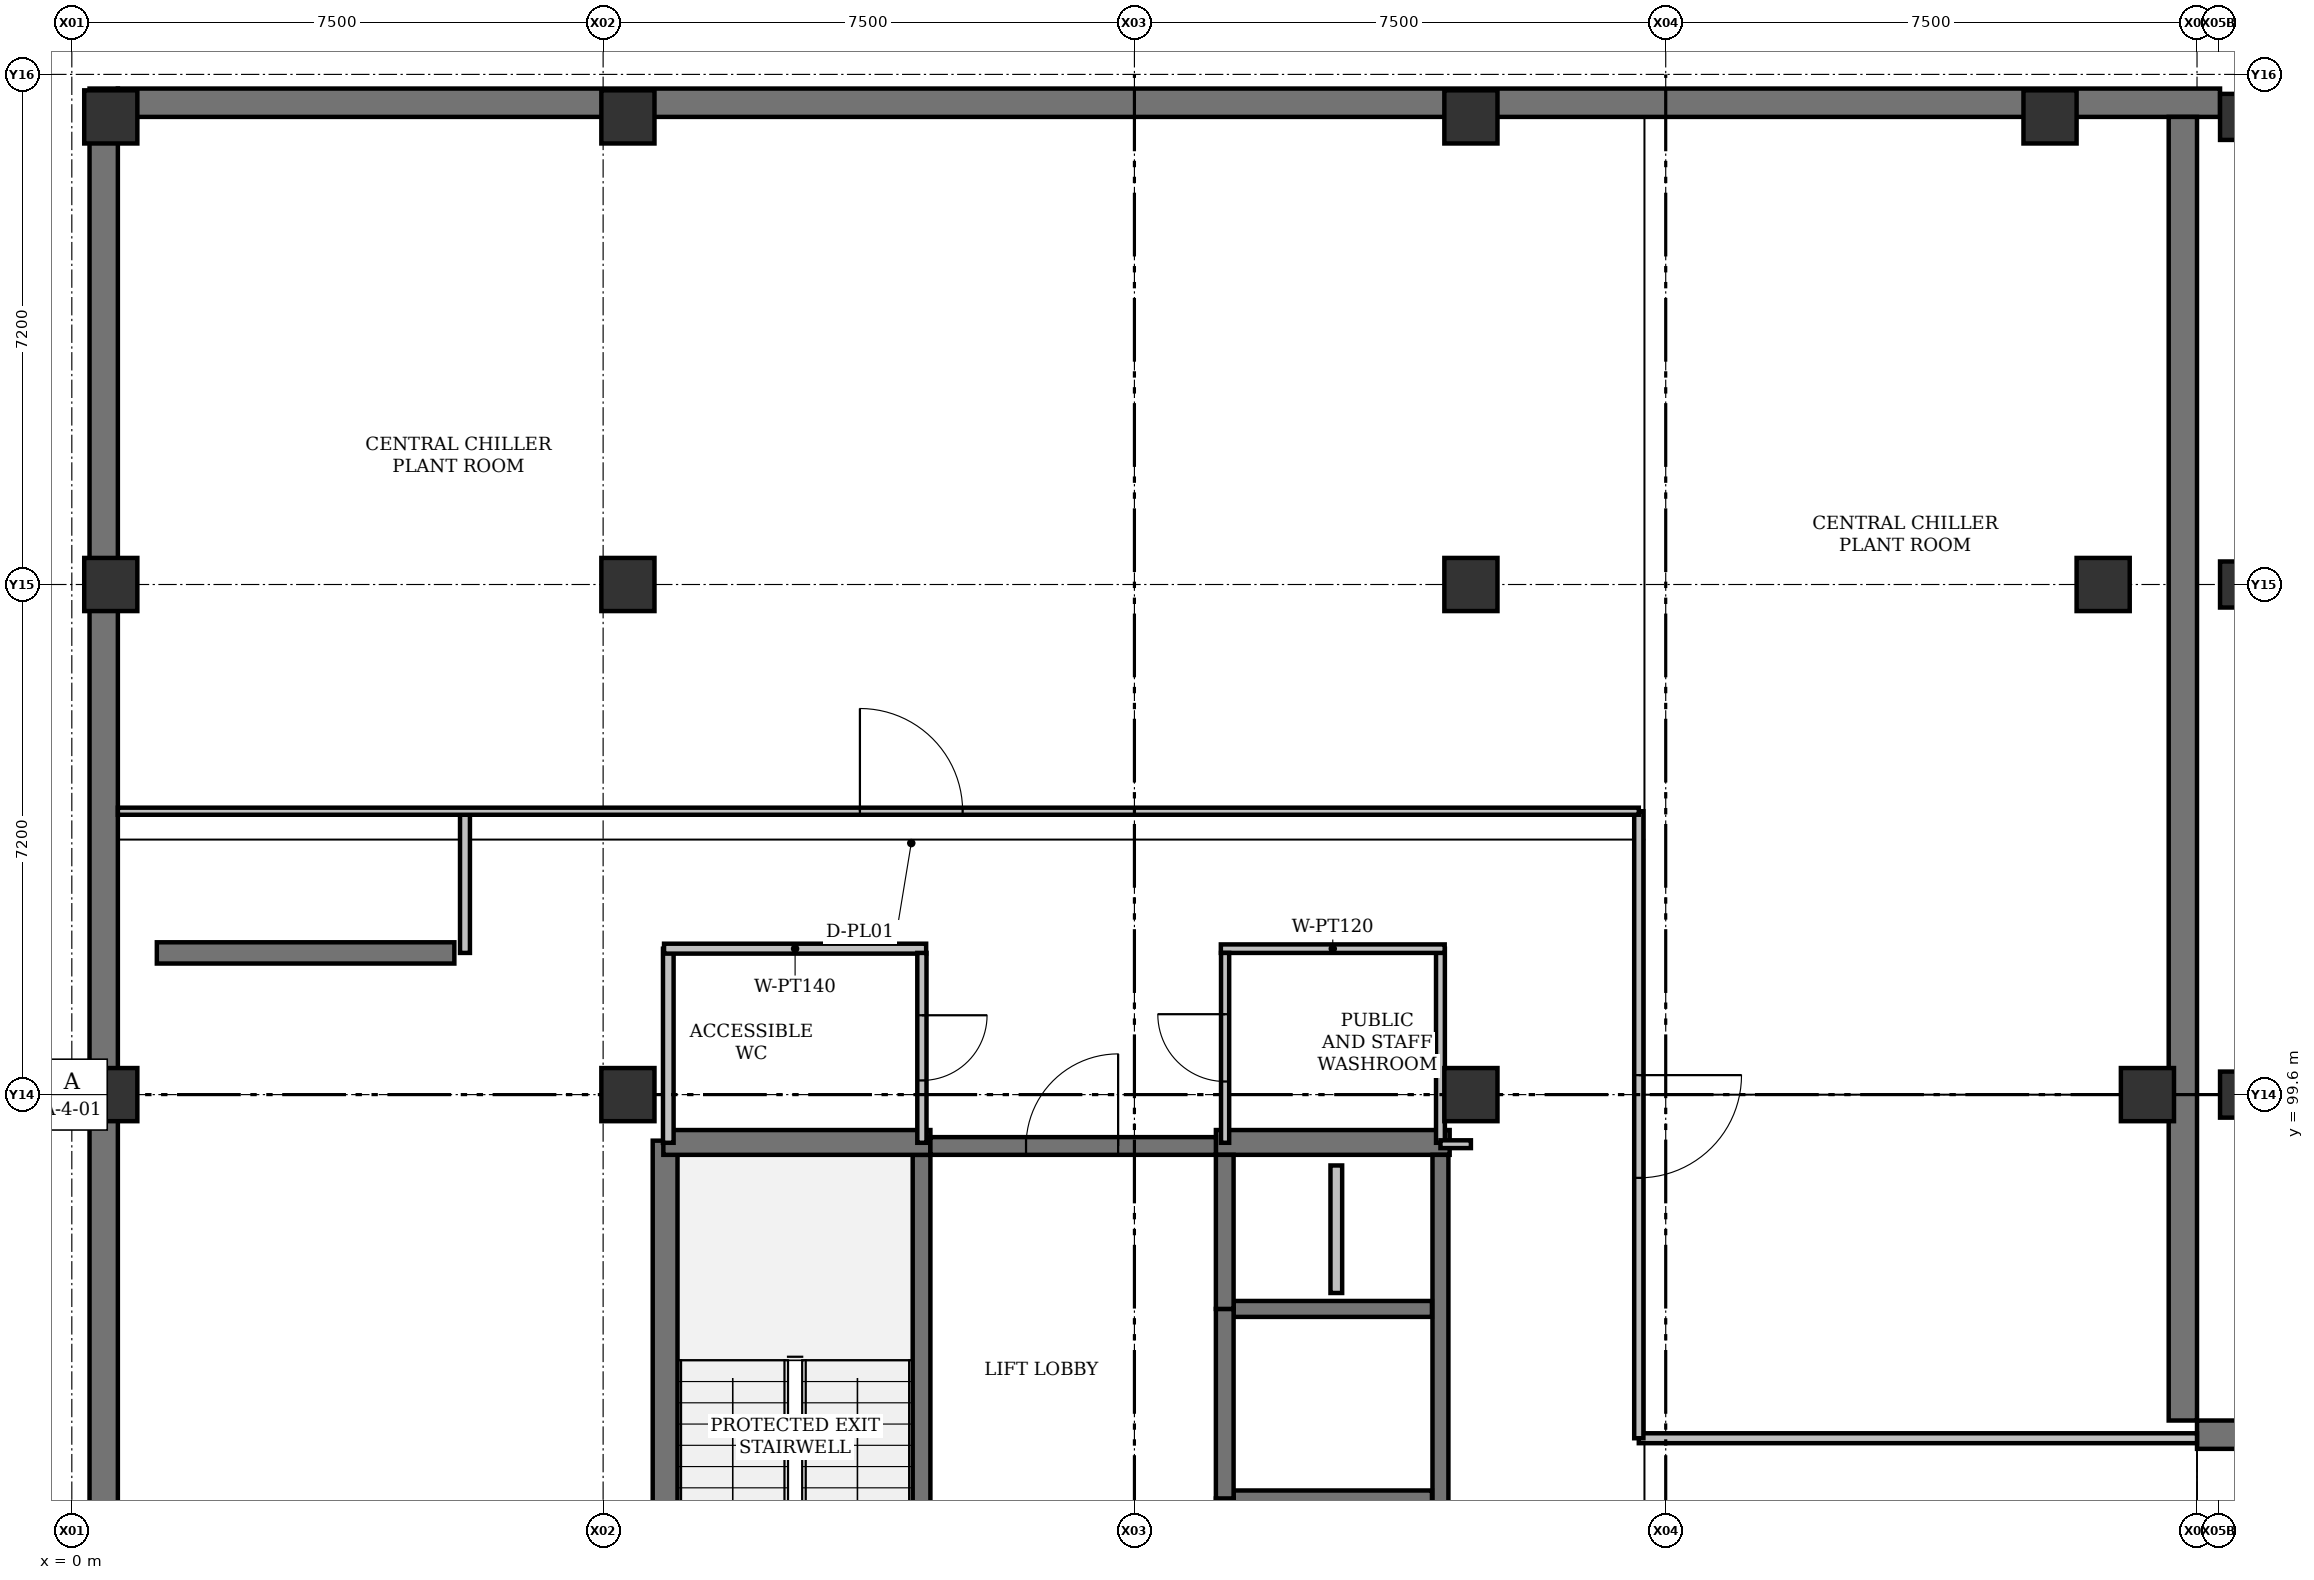
"""IFC4 building model, lengths in metres.
Left out: names, types, materials, properties, quantities, classifications, styles, units other than length and angle.
Written with IfcOpenShell. Run it as: python <this file> out.ifc"""

import sys

from ifc_helpers import new_model, si_unit, direction, frame, frame_2d, origin, origin_2d, place, context, subcontext, project, spatial, rectangle, extrude, element, fill, save


model = new_model("IFC4")
c1 = context("Model", 3, precision=1e-05, world=origin(), true_north=direction((0.0, 1.0)))
c2 = subcontext(c1, "Body", "Model", "MODEL_VIEW")
j1 = project(units=[si_unit("LENGTHUNIT", "METRE"), si_unit("PLANEANGLEUNIT", "RADIAN")], contexts=[c1])
p1 = place(None, origin())
s1 = spatial("IfcSite", under=j1, at=p1, CompositionType="ELEMENT")
p2 = place(p1, origin())
s2 = spatial("IfcBuilding", under=s1, at=p2, CompositionType="ELEMENT")
p3 = place(p2, frame((0.0, 0.0, -8.4)))
s3 = spatial("IfcBuildingStorey", under=s2, at=p3, CompositionType="ELEMENT", Elevation=-8.4)
for number, where, z_axis, x_axis in (
    (1, (0.55, 99.6, -0.3), (0.0, 0.0, 1.0), (1.0, 0.0, 0.0)),
    (2, (7.85, 99.6, -0.3), (0.0, 0.0, 1.0), (1.0, 0.0, 0.0)),
    (3, (19.75, 99.6, -0.3), (0.0, 0.0, 1.0), (1.0, 0.0, 0.0)),
    (4, (29.3, 99.6, -0.3), (0.0, 0.0, 1.0), (1.0, 0.0, 0.0)),
    (5, (0.55, 106.8, -0.3), (0.0, 0.0, 1.0), (1.0, 0.0, 0.0)),
    (6, (7.85, 106.8, -0.3), (0.0, 0.0, 1.0), (1.0, 0.0, 0.0)),
    (7, (19.75, 106.8, -0.3), (0.0, 0.0, 1.0), (1.0, 0.0, 0.0)),
    (8, (28.675, 106.8, -0.3), (0.0, 0.0, 1.0), (1.0, 0.0, 0.0)),
    (9, (0.55, 113.4, -0.3), (0.0, 0.0, 1.0), (1.0, 0.0, 0.0)),
    (10, (7.85, 113.4, -0.3), (0.0, 0.0, 1.0), (1.0, 0.0, 0.0)),
    (11, (19.75, 113.4, -0.3), (0.0, 0.0, 1.0), (1.0, 0.0, 0.0)),
    (12, (27.925, 113.4, -0.3), (0.0, 0.0, 1.0), (1.0, 0.0, 0.0)),
):
    element("IfcColumn", number, at=place(p3, frame(where, z_axis=z_axis, x_axis=x_axis)), inside=s3, PredefinedType="COLUMN", context=c2, shape_type="SweptSolid", body=[
        extrude(rectangle(XDim=0.75, YDim=0.75, at=origin_2d()), origin(), (0.0, 0.0, 1.0), 4.5),
    ])
for number, where, z_axis, x_axis in (
    (13, (30.65, 113.4, -0.3), (0.0, 0.0, 1.0), (1.0, 0.0, 0.0)),
    (14, (30.65, 99.6, -0.3), (0.0, 0.0, 1.0), (1.0, 0.0, 0.0)),
    (15, (30.65, 106.8, -0.3), (0.0, 0.0, 1.0), (1.0, 0.0, 0.0)),
):
    element("IfcColumn", number, at=place(p3, frame(where, z_axis=z_axis, x_axis=x_axis)), inside=s3, PredefinedType="COLUMN", context=c2, shape_type="SweptSolid", body=[
        extrude(rectangle(XDim=0.65, YDim=0.65, at=origin_2d()), origin(), (0.0, 0.0, 1.0), 4.5),
    ])
p4 = place(p3, frame((0.45, 0.2, -0.3), z_axis=(0.0, 0.0, 1.0), x_axis=(0.0, 1.0, 0.0)))
e16 = element("IfcWall", 16, at=p4, inside=s3, PredefinedType="USERDEFINED", context=c2, shape_type="SweptSolid", body=[
    extrude(rectangle(XDim=113.6, YDim=0.4, at=frame_2d((56.8, 0.0))), origin(), (0.0, 0.0, 1.0), 4.26),
])
p5 = place(p3, frame((0.65, 113.6, -0.3), z_axis=(0.0, 0.0, 1.0), x_axis=(1.0, 0.0, 0.0)))
e17 = element("IfcWall", 17, at=p5, inside=s3, PredefinedType="USERDEFINED", context=c2, shape_type="SweptSolid", body=[
    extrude(rectangle(XDim=29.675, YDim=0.4, at=frame_2d((14.837, 0.0))), origin(), (0.0, 0.0, 1.0), 4.26),
])
p6 = place(p3, frame((29.8, 113.4, -0.3), z_axis=(0.0, 0.0, 1.0), x_axis=(0.0, -1.0, 0.0)))
e18 = element("IfcWall", 18, at=p6, inside=s3, PredefinedType="USERDEFINED", context=c2, shape_type="SweptSolid", body=[
    extrude(rectangle(XDim=18.4, YDim=0.4, at=frame_2d((9.2, 0.0))), origin(), (0.0, 0.0, 1.0), 4.26),
])
p7 = place(p3, frame((30.0, 94.8, -0.3), z_axis=(0.0, 0.0, 1.0), x_axis=(1.0, 0.0, 0.0)))
e19 = element("IfcWall", 19, at=p7, inside=s3, PredefinedType="USERDEFINED", context=c2, shape_type="SweptSolid", body=[
    extrude(rectangle(XDim=37.0, YDim=0.4, at=frame_2d((18.5, 0.0))), origin(), (0.0, 0.0, 1.0), 4.26),
])
p8 = place(p3, frame((8.375, 90.775, -0.3), z_axis=(0.0, 0.0, 1.0), x_axis=(0.0, 1.0, 0.0)))
e20 = element("IfcWall", 20, at=p8, inside=s3, PredefinedType="SHEAR", context=c2, shape_type="SweptSolid", body=[
    extrude(rectangle(XDim=8.175, YDim=0.35, at=frame_2d((4.087, 0.0))), origin(), (0.0, 0.0, 1.0), 4.5),
])
p9 = place(p3, frame((11.995, 90.9, -0.3), z_axis=(0.0, 0.0, 1.0), x_axis=(0.0, 1.0, 0.0)))
e21 = element("IfcWall", 21, at=p9, inside=s3, PredefinedType="SHEAR", context=c2, shape_type="SweptSolid", body=[
    extrude(rectangle(XDim=7.85, YDim=0.25, at=frame_2d((3.925, 0.0))), origin(), (0.0, 0.0, 1.0), 4.5),
])
p10 = place(p3, frame((8.35, 98.925, -0.3), z_axis=(0.0, 0.0, 1.0), x_axis=(1.0, 0.0, 0.0)))
e22 = element("IfcWall", 22, at=p10, inside=s3, PredefinedType="SHEAR", context=c2, shape_type="SweptSolid", body=[
    extrude(rectangle(XDim=3.77, YDim=0.35, at=frame_2d((1.885, 0.0))), origin(), (0.0, 0.0, 1.0), 4.5),
])
p11 = place(p3, frame((16.15, 98.925, -0.3), z_axis=(0.0, 0.0, 1.0), x_axis=(1.0, 0.0, 0.0)))
e23 = element("IfcWall", 23, at=p11, inside=s3, PredefinedType="SHEAR", context=c2, shape_type="SweptSolid", body=[
    extrude(rectangle(XDim=3.3, YDim=0.35, at=frame_2d((1.65, 0.0))), origin(), (0.0, 0.0, 1.0), 4.5),
])
p12 = place(p3, frame((12.12, 98.875, -0.3), z_axis=(0.0, 0.0, 1.0), x_axis=(1.0, 0.0, 0.0)))
e24 = element("IfcWall", 24, at=p12, inside=s3, PredefinedType="SHEAR", context=c2, shape_type="SweptSolid", body=[
    extrude(rectangle(XDim=4.03, YDim=0.25, at=frame_2d((2.015, 0.0))), origin(), (0.0, 0.0, 1.0), 4.5),
])
p13 = place(p12, frame((1.35, 0.0, 0.3)))
e25 = element("IfcOpeningElement", 25, at=p13, cuts=e24, PredefinedType="OPENING", context=c2, shape_type="SweptSolid", body=[
    extrude(rectangle(XDim=1.3, YDim=2.2, at=frame_2d((0.65, 1.1))), frame((0.0, 0.125, 0.0), z_axis=(0.0, -1.0, 0.0), x_axis=(1.0, 0.0, 0.0)), (0.0, 0.0, 1.0), 0.25),
])
p14 = place(p3, frame((19.32, 84.8, -0.3), z_axis=(0.0, 0.0, 1.0), x_axis=(0.0, 1.0, 0.0)))
e26 = element("IfcWall", 26, at=p14, inside=s3, PredefinedType="SHEAR", context=c2, shape_type="SweptSolid", body=[
    extrude(rectangle(XDim=13.95, YDim=0.225, at=frame_2d((6.975, 0.0))), origin(), (0.0, 0.0, 1.0), 4.5),
])
for number, where, z_axis, x_axis in (
    (27, (16.4, 93.9, -0.3), (0.0, 0.0, 1.0), (1.0, 0.0, 0.0)),
    (28, (16.4, 96.575, -0.3), (0.0, 0.0, 1.0), (1.0, 0.0, 0.0)),
):
    element("IfcWall", number, at=place(p3, frame(where, z_axis=z_axis, x_axis=x_axis)), inside=s3, PredefinedType="SHEAR", context=c2, shape_type="SweptSolid", body=[
        extrude(rectangle(XDim=2.8, YDim=0.225, at=frame_2d((1.4, 0.0))), origin(), (0.0, 0.0, 1.0), 4.5),
    ])
p15 = place(p3, frame((16.275, 91.725, -0.3), z_axis=(0.0, 0.0, 1.0), x_axis=(0.0, 1.0, 0.0)))
e29 = element("IfcWall", 29, at=p15, inside=s3, PredefinedType="SHEAR", context=c2, shape_type="SweptSolid", body=[
    extrude(rectangle(XDim=2.175, YDim=0.25, at=frame_2d((1.087, 0.0))), origin(), (0.0, 0.0, 1.0), 4.5),
])
p16 = place(p15, frame((0.55, 0.0, 0.3)))
e30 = element("IfcOpeningElement", 30, at=p16, cuts=e29, PredefinedType="OPENING", context=c2, shape_type="SweptSolid", body=[
    extrude(rectangle(XDim=1.05, YDim=2.15, at=frame_2d((0.525, 1.075))), frame((0.0, 0.125, 0.0), z_axis=(0.0, -1.0, 0.0), x_axis=(1.0, 0.0, 0.0)), (0.0, 0.0, 1.0), 0.25),
])
p17 = place(p3, frame((16.275, 93.9, -0.3), z_axis=(0.0, 0.0, 1.0), x_axis=(0.0, 1.0, 0.0)))
e31 = element("IfcWall", 31, at=p17, inside=s3, PredefinedType="SHEAR", context=c2, shape_type="SweptSolid", body=[
    extrude(rectangle(XDim=2.675, YDim=0.25, at=frame_2d((1.337, 0.0))), origin(), (0.0, 0.0, 1.0), 4.5),
])
p18 = place(p3, frame((16.275, 96.575, -0.3), z_axis=(0.0, 0.0, 1.0), x_axis=(0.0, 1.0, 0.0)))
e32 = element("IfcWall", 32, at=p18, inside=s3, PredefinedType="SHEAR", context=c2, shape_type="SweptSolid", body=[
    extrude(rectangle(XDim=2.175, YDim=0.25, at=frame_2d((1.087, 0.0))), origin(), (0.0, 0.0, 1.0), 4.5),
])
p19 = place(p3, frame((17.85, 96.8, -0.3), z_axis=(0.0, 0.0, 1.0), x_axis=(0.0, 1.0, 0.0)))
e33 = element("IfcWall", 33, at=p19, inside=s3, PredefinedType="PLUMBINGWALL", context=c2, shape_type="SweptSolid", body=[
    extrude(rectangle(XDim=1.8, YDim=0.165, at=frame_2d((0.9, 0.0))), origin(), (0.0, 0.0, 1.0), 4.5),
])
p20 = place(p3, frame((1.2, 101.6, -0.3), z_axis=(0.0, 0.0, 1.0), x_axis=(1.0, 0.0, 0.0)))
e34 = element("IfcWall", 34, at=p20, inside=s3, PredefinedType="SHEAR", context=c2, shape_type="SweptSolid", body=[
    extrude(rectangle(XDim=4.2, YDim=0.3, at=frame_2d((2.1, 0.0))), origin(), (0.0, 0.0, 1.0), 4.5),
])
p21 = place(p3, frame((8.42, 98.92, 0.0), z_axis=(0.0, 0.0, 1.0), x_axis=(0.0, 1.0, 0.0)))
e35 = element("IfcWall", 35, at=p21, inside=s3, PredefinedType="PARTITIONING", context=c2, shape_type="SweptSolid", body=[
    extrude(rectangle(XDim=2.74, YDim=0.15, at=frame_2d((1.37, 0.0))), origin(), (0.0, 0.0, 1.0), 3.411),
])
p22 = place(p3, frame((8.36, 101.66, 0.0), z_axis=(0.0, 0.0, 1.0), x_axis=(1.0, 0.0, 0.0)))
e36 = element("IfcWall", 36, at=p22, inside=s3, PredefinedType="PARTITIONING", context=c2, shape_type="SweptSolid", body=[
    extrude(rectangle(XDim=3.7, YDim=0.14, at=frame_2d((1.85, 0.0))), origin(), (0.0, 0.0, 1.0), 3.95),
])
p23 = place(p3, frame((12.0, 101.6, 0.0), z_axis=(0.0, 0.0, 1.0), x_axis=(0.0, -1.0, 0.0)))
e37 = element("IfcWall", 37, at=p23, inside=s3, PredefinedType="PARTITIONING", context=c2, shape_type="SweptSolid", body=[
    extrude(rectangle(XDim=2.68, YDim=0.13, at=frame_2d((1.34, 0.0))), origin(), (0.0, 0.0, 1.0), 3.411),
])
p24 = place(p23, frame((0.88, 0.0, 0.0)))
e38 = element("IfcOpeningElement", 38, at=p24, cuts=e37, PredefinedType="OPENING", context=c2, shape_type="SweptSolid", body=[
    extrude(rectangle(XDim=0.92, YDim=2.1, at=frame_2d((0.46, 1.05))), frame((0.0, 0.065, 0.0), z_axis=(0.0, -1.0, 0.0), x_axis=(1.0, 0.0, 0.0)), (0.0, 0.0, 1.0), 0.13),
])
p25 = place(p3, frame((19.32, 98.92, 0.0), z_axis=(0.0, 0.0, 1.0), x_axis=(0.0, 1.0, 0.0)))
e39 = element("IfcWall", 39, at=p25, inside=s3, PredefinedType="PARTITIONING", context=c2, shape_type="SweptSolid", body=[
    extrude(rectangle(XDim=2.74, YDim=0.125, at=frame_2d((1.37, 0.0))), origin(), (0.0, 0.0, 1.0), 3.411),
])
p26 = place(p3, frame((19.38, 101.66, 0.0), z_axis=(0.0, 0.0, 1.0), x_axis=(-1.0, 0.0, 0.0)))
e40 = element("IfcWall", 40, at=p26, inside=s3, PredefinedType="PARTITIONING", context=c2, shape_type="SweptSolid", body=[
    extrude(rectangle(XDim=3.16, YDim=0.12, at=frame_2d((1.58, 0.0))), origin(), (0.0, 0.0, 1.0), 3.95),
])
p27 = place(p3, frame((16.28, 98.92, 0.0), z_axis=(0.0, 0.0, 1.0), x_axis=(0.0, 1.0, 0.0)))
e41 = element("IfcWall", 41, at=p27, inside=s3, PredefinedType="PARTITIONING", context=c2, shape_type="SweptSolid", body=[
    extrude(rectangle(XDim=2.68, YDim=0.115, at=frame_2d((1.34, 0.0))), origin(), (0.0, 0.0, 1.0), 3.411),
])
p28 = place(p27, frame((0.865, 0.0, 0.0)))
e42 = element("IfcOpeningElement", 42, at=p28, cuts=e41, PredefinedType="OPENING", context=c2, shape_type="SweptSolid", body=[
    extrude(rectangle(XDim=0.95, YDim=2.1, at=frame_2d((0.475, 1.05))), frame((0.0, 0.058, 0.0), z_axis=(0.0, -1.0, 0.0), x_axis=(1.0, 0.0, 0.0)), (0.0, 0.0, 1.0), 0.115),
])
p29 = place(p3, frame((19.75, 98.9, 0.0), z_axis=(0.0, 0.0, 1.0), x_axis=(-1.0, 0.0, 0.0)))
e43 = element("IfcWall", 43, at=p29, inside=s3, PredefinedType="PARTITIONING", context=c2, shape_type="SweptSolid", body=[
    extrude(rectangle(XDim=0.43, YDim=0.11, at=frame_2d((0.215, 0.0))), origin(), (0.0, 0.0, 1.0), 3.487),
])
p30 = place(p3, frame((5.55, 101.6, 0.0), z_axis=(0.0, 0.0, 1.0), x_axis=(0.0, 1.0, 0.0)))
e44 = element("IfcWall", 44, at=p30, inside=s3, PredefinedType="PARTITIONING", context=c2, shape_type="SweptSolid", body=[
    extrude(rectangle(XDim=2.0, YDim=0.14, at=frame_2d((1.0, 0.0))), origin(), (0.0, 0.0, 1.0), 3.637),
])
p31 = place(p3, frame((22.12, 94.75, 0.0), z_axis=(0.0, 0.0, 1.0), x_axis=(1.0, 0.0, 0.0)))
e45 = element("IfcWall", 45, at=p31, inside=s3, PredefinedType="PARTITIONING", context=c2, shape_type="SweptSolid", body=[
    extrude(rectangle(XDim=7.88, YDim=0.14, at=frame_2d((3.94, 0.0))), origin(), (0.0, 0.0, 1.0), 3.537),
])
p32 = place(p3, frame((22.12, 103.6, 0.0), z_axis=(0.0, 0.0, 1.0), x_axis=(0.0, -1.0, 0.0)))
e46 = element("IfcWall", 46, at=p32, inside=s3, PredefinedType="PARTITIONING", context=c2, shape_type="SweptSolid", body=[
    extrude(rectangle(XDim=8.85, YDim=0.13, at=frame_2d((4.425, 0.0))), origin(), (0.0, 0.0, 1.0), 3.411),
])
p33 = place(p32, frame((3.725, 0.0, 0.0)))
e47 = element("IfcOpeningElement", 47, at=p33, cuts=e46, PredefinedType="OPENING", context=c2, shape_type="SweptSolid", body=[
    extrude(rectangle(XDim=1.45, YDim=2.2, at=frame_2d((0.725, 1.1))), frame((0.0, 0.065, 0.0), z_axis=(0.0, -1.0, 0.0), x_axis=(1.0, 0.0, 0.0)), (0.0, 0.0, 1.0), 0.13),
])
p34 = place(p3, frame((0.65, 103.6, 0.0), z_axis=(0.0, 0.0, 1.0), x_axis=(1.0, 0.0, 0.0)))
e48 = element("IfcWall", 48, at=p34, inside=s3, PredefinedType="PARTITIONING", context=c2, shape_type="SweptSolid", body=[
    extrude(rectangle(XDim=21.47, YDim=0.1, at=frame_2d((10.735, 0.0))), origin(), (0.0, 0.0, 1.0), 3.487),
])
p35 = place(p34, frame((10.475, 0.0, 0.0)))
e49 = element("IfcOpeningElement", 49, at=p35, cuts=e48, PredefinedType="OPENING", context=c2, shape_type="SweptSolid", body=[
    extrude(rectangle(XDim=1.45, YDim=2.2, at=frame_2d((0.725, 1.1))), frame((0.0, 0.05, 0.0), z_axis=(0.0, -1.0, 0.0), x_axis=(1.0, 0.0, 0.0)), (0.0, 0.0, 1.0), 0.1),
])
p36 = place(p13, origin())
e50 = element("IfcDoor", 50, at=p36, inside=s3, OperationType="SINGLE_SWING_RIGHT", PredefinedType="DOOR", context=c2, shape_type="SweptSolid", body=[
    extrude(rectangle(XDim=1.3, YDim=2.2, at=frame_2d((0.65, 1.1))), frame((0.0, 0.025, 0.0), z_axis=(0.0, -1.0, 0.0), x_axis=(1.0, 0.0, 0.0)), (0.0, 0.0, 1.0), 0.05),
])
fill(e25, e50)
p37 = place(p24, origin())
e51 = element("IfcDoor", 51, at=p37, inside=s3, OperationType="SINGLE_SWING_LEFT", PredefinedType="DOOR", context=c2, shape_type="SweptSolid", body=[
    extrude(rectangle(XDim=0.92, YDim=2.1, at=frame_2d((0.46, 1.05))), frame((0.0, 0.025, 0.0), z_axis=(0.0, -1.0, 0.0), x_axis=(1.0, 0.0, 0.0)), (0.0, 0.0, 1.0), 0.05),
])
fill(e38, e51)
p38 = place(p28, origin())
e52 = element("IfcDoor", 52, at=p38, inside=s3, OperationType="SINGLE_SWING_RIGHT", PredefinedType="DOOR", context=c2, shape_type="SweptSolid", body=[
    extrude(rectangle(XDim=0.95, YDim=2.1, at=frame_2d((0.475, 1.05))), frame((0.0, 0.025, 0.0), z_axis=(0.0, -1.0, 0.0), x_axis=(1.0, 0.0, 0.0)), (0.0, 0.0, 1.0), 0.05),
])
fill(e42, e52)
p39 = place(p33, origin())
e53 = element("IfcDoor", 53, at=p39, inside=s3, OperationType="SINGLE_SWING_LEFT", PredefinedType="DOOR", context=c2, shape_type="SweptSolid", body=[
    extrude(rectangle(XDim=1.45, YDim=2.2, at=frame_2d((0.725, 1.1))), frame((0.0, 0.025, 0.0), z_axis=(0.0, -1.0, 0.0), x_axis=(1.0, 0.0, 0.0)), (0.0, 0.0, 1.0), 0.05),
])
fill(e47, e53)
p40 = place(p35, origin())
e54 = element("IfcDoor", 54, at=p40, inside=s3, OperationType="SINGLE_SWING_LEFT", PredefinedType="DOOR", context=c2, shape_type="SweptSolid", body=[
    extrude(rectangle(XDim=1.45, YDim=2.2, at=frame_2d((0.725, 1.1))), frame((0.0, 0.025, 0.0), z_axis=(0.0, -1.0, 0.0), x_axis=(1.0, 0.0, 0.0)), (0.0, 0.0, 1.0), 0.05),
])
fill(e49, e54)
save(model, sys.argv[1])
